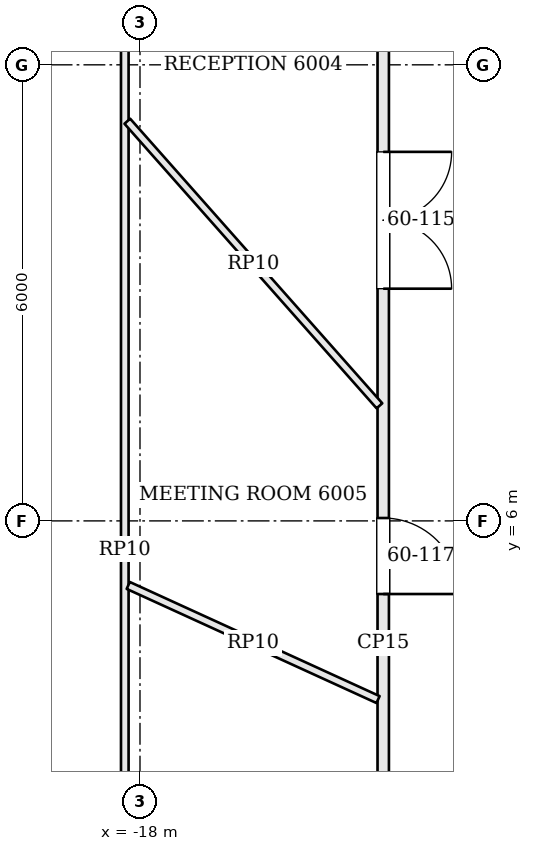
"""IFC4 building model, lengths in metres.
Left out: names, types, materials, properties, quantities, classifications, styles, units other than length and angle.
Written with IfcOpenShell. Run it as: python <this file> out.ifc"""

import sys

from ifc_helpers import new_model, si_unit, direction, frame, frame_2d, origin, origin_2d, place, context, subcontext, project, spatial, rectangle, extrude, element, fill, save


model = new_model("IFC4")
c1 = context("Model", 3, precision=1e-05, world=origin(), true_north=direction((0.0, 1.0)))
c2 = subcontext(c1, "Body", "Model", "MODEL_VIEW")
j1 = project(units=[si_unit("LENGTHUNIT", "METRE"), si_unit("PLANEANGLEUNIT", "RADIAN")], contexts=[c1])
p1 = place(None, origin())
s1 = spatial("IfcSite", under=j1, at=p1, CompositionType="ELEMENT")
p2 = place(p1, origin())
s2 = spatial("IfcBuilding", under=s1, at=p2, CompositionType="ELEMENT")
p3 = place(p2, frame((0.0, 0.0, 244.8)))
s3 = spatial("IfcBuildingStorey", under=s2, at=p3, CompositionType="ELEMENT", Elevation=244.8)
p4 = place(p3, frame((-19.593, 12.79, 0.0), z_axis=(0.0, 0.0, 1.0), x_axis=(-0.744021317198, -0.668155879683, 0.0)))
e1 = element("IfcColumn", 1, at=p4, inside=s3, PredefinedType="COLUMN", context=c2, shape_type="SweptSolid", body=[
    extrude(rectangle(XDim=1.0, YDim=1.0, at=origin_2d()), origin(), (0.0, 0.0, 1.0), 3.9),
])
p5 = place(p3, frame((-14.8, 12.376, 0.0), z_axis=(0.0, 0.0, 1.0), x_axis=(0.0, -1.0, 0.0)))
e2 = element("IfcWall", 2, at=p5, inside=s3, PredefinedType="PARTITIONING", context=c2, shape_type="SweptSolid", body=[
    extrude(rectangle(XDim=15.958, YDim=0.15, at=frame_2d((7.979, 0.0))), origin(), (0.0, 0.0, 1.0), 3.084),
])
p6 = place(p5, frame((1.521, 0.0, 0.0)))
e3 = element("IfcOpeningElement", 3, at=p6, cuts=e2, PredefinedType="OPENING", context=c2, shape_type="SweptSolid", body=[
    extrude(rectangle(XDim=1.8, YDim=2.1, at=frame_2d((0.9, 1.05))), frame((0.0, 0.085, 0.0), z_axis=(0.0, -1.0, 0.0), x_axis=(1.0, 0.0, 0.0)), (0.0, 0.0, 1.0), 0.17),
])
p7 = place(p5, frame((6.338, 0.0, 0.0)))
e4 = element("IfcOpeningElement", 4, at=p7, cuts=e2, PredefinedType="OPENING", context=c2, shape_type="SweptSolid", body=[
    extrude(rectangle(XDim=1.0, YDim=2.4, at=frame_2d((0.5, 1.2))), frame((0.0, 0.085, 0.0), z_axis=(0.0, -1.0, 0.0), x_axis=(1.0, 0.0, 0.0)), (0.0, 0.0, 1.0), 0.17),
])
p8 = place(p3, frame((-18.2, -5.006, 0.0), z_axis=(0.0, 0.0, 1.0), x_axis=(0.0, 1.0, 0.0)))
e5 = element("IfcWall", 5, at=p8, inside=s3, PredefinedType="PARTITIONING", context=c2, shape_type="SweptSolid", body=[
    extrude(rectangle(XDim=21.26, YDim=0.1, at=frame_2d((10.63, 0.0))), origin(), (0.0, 0.0, 1.0), 3.084),
])
p9 = place(p8, frame((18.745, 0.0, 0.0)))
e6 = element("IfcOpeningElement", 6, at=p9, cuts=e5, PredefinedType="OPENING", context=c2, shape_type="SweptSolid", body=[
    extrude(rectangle(XDim=1.0, YDim=2.1, at=frame_2d((0.5, 1.05))), frame((0.0, 0.06, 0.0), z_axis=(0.0, -1.0, 0.0), x_axis=(1.0, 0.0, 0.0)), (0.0, 0.0, 1.0), 0.12),
])
p10 = place(p8, frame((6.489, 0.0, 0.0)))
e7 = element("IfcOpeningElement", 7, at=p10, cuts=e5, PredefinedType="OPENING", context=c2, shape_type="SweptSolid", body=[
    extrude(rectangle(XDim=0.9, YDim=2.1, at=frame_2d((0.45, 1.05))), frame((0.0, 0.06, 0.0), z_axis=(0.0, -1.0, 0.0), x_axis=(1.0, 0.0, 0.0)), (0.0, 0.0, 1.0), 0.12),
])
p11 = place(p8, frame((1.731, 0.0, 0.0)))
e8 = element("IfcOpeningElement", 8, at=p11, cuts=e5, PredefinedType="OPENING", context=c2, shape_type="SweptSolid", body=[
    extrude(rectangle(XDim=0.9, YDim=2.1, at=frame_2d((0.45, 1.05))), frame((0.0, 0.06, 0.0), z_axis=(0.0, -1.0, 0.0), x_axis=(1.0, 0.0, 0.0)), (0.0, 0.0, 1.0), 0.12),
])
p12 = place(p3, frame((-14.85, 7.514, 0.0), z_axis=(0.0, 0.0, 1.0), x_axis=(-0.663136045348, 0.748498888015, 0.0)))
e9 = element("IfcWall", 9, at=p12, inside=s3, PredefinedType="PARTITIONING", context=c2, shape_type="SweptSolid", body=[
    extrude(rectangle(XDim=5.002, YDim=0.1, at=frame_2d((2.501, 0.0))), origin(), (0.0, 0.0, 1.0), 3.084),
])
p13 = place(p3, frame((-14.868, 3.649, 0.0), z_axis=(0.0, 0.0, 1.0), x_axis=(-0.909566433152, 0.41555854423, 0.0)))
e10 = element("IfcWall", 10, at=p13, inside=s3, PredefinedType="PARTITIONING", context=c2, shape_type="SweptSolid", body=[
    extrude(rectangle(XDim=3.613, YDim=0.1, at=frame_2d((1.807, 0.0))), origin(), (0.0, 0.0, 1.0), 3.084),
])
p14 = place(p6, origin())
e11 = element("IfcDoor", 11, at=p14, inside=s3, OperationType="DOUBLE_DOOR_SINGLE_SWING", PredefinedType="DOOR", context=c2, shape_type="SweptSolid", body=[
    extrude(rectangle(XDim=1.8, YDim=2.1, at=frame_2d((0.9, 1.05))), frame((0.0, 0.025, 0.0), z_axis=(0.0, -1.0, 0.0), x_axis=(1.0, 0.0, 0.0)), (0.0, 0.0, 1.0), 0.05),
])
fill(e3, e11)
p15 = place(p7, origin())
e12 = element("IfcDoor", 12, at=p15, inside=s3, OperationType="SINGLE_SWING_RIGHT", PredefinedType="DOOR", context=c2, shape_type="SweptSolid", body=[
    extrude(rectangle(XDim=1.0, YDim=2.4, at=frame_2d((0.5, 1.2))), frame((0.0, 0.025, 0.0), z_axis=(0.0, -1.0, 0.0), x_axis=(1.0, 0.0, 0.0)), (0.0, 0.0, 1.0), 0.05),
])
fill(e4, e12)
save(model, sys.argv[1])
